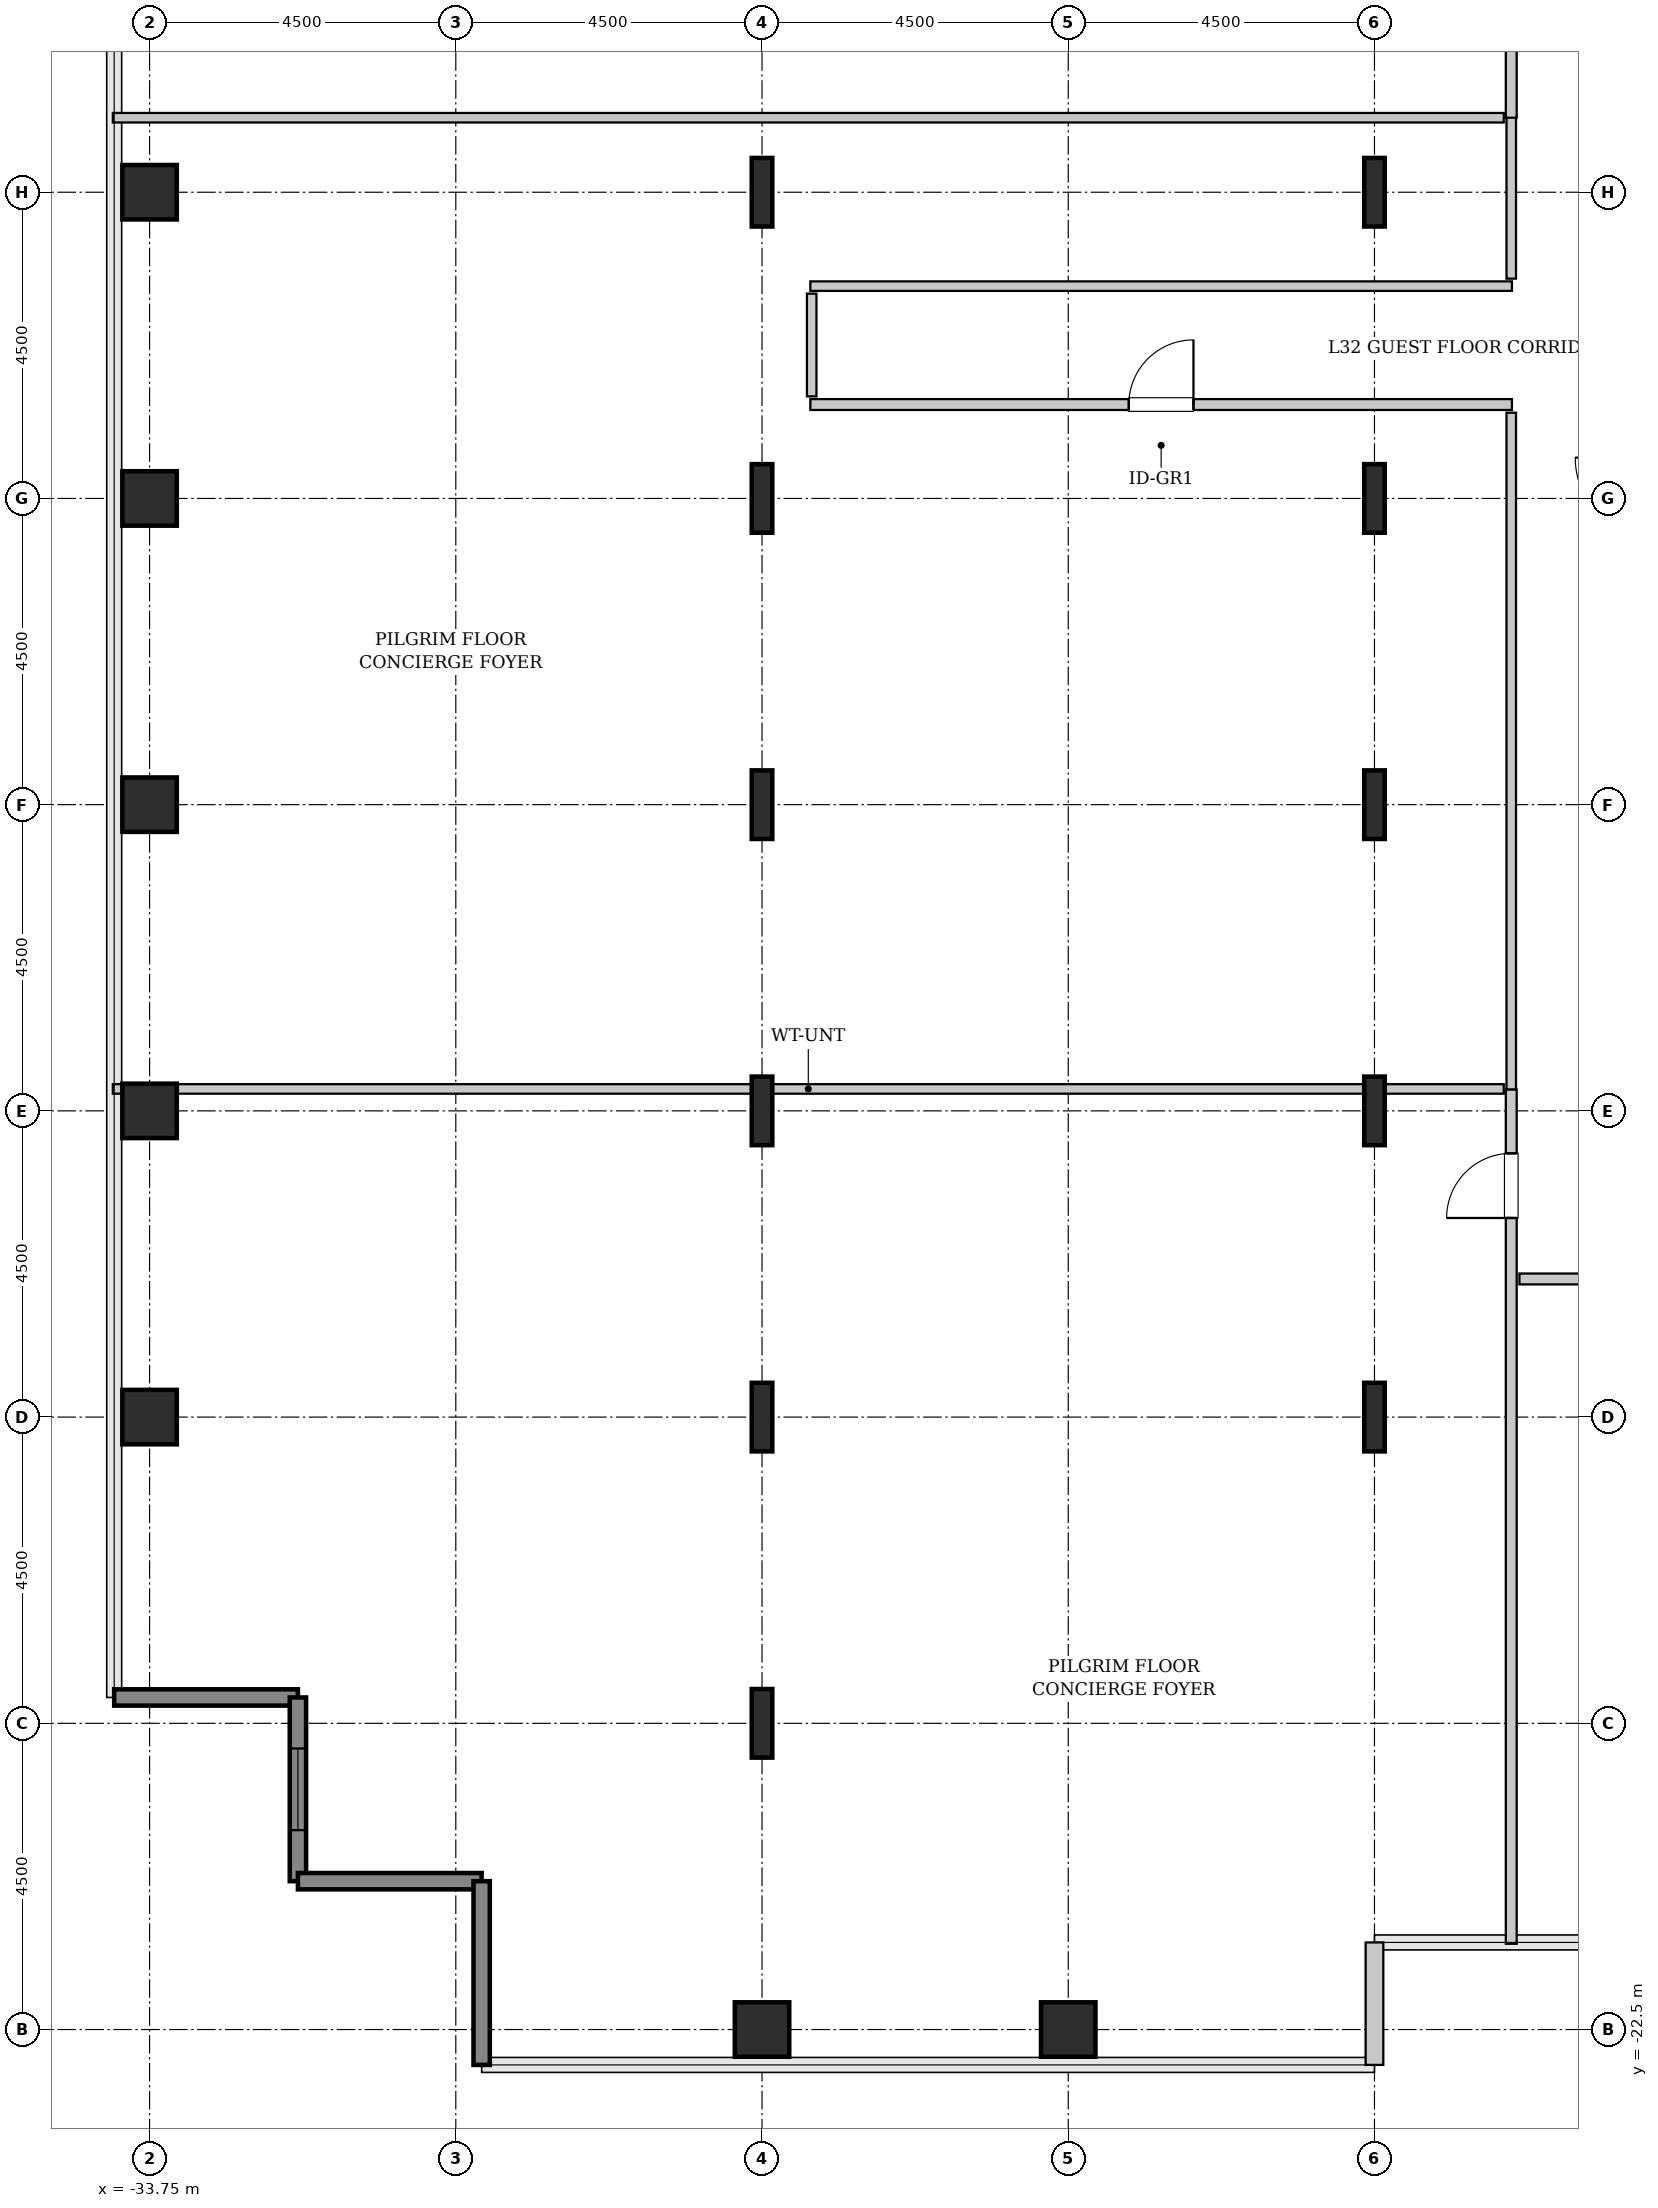
"""IFC4 building model, lengths in metres.
Left out: names, types, materials, properties, quantities, classifications, styles, units other than length and angle.
Written with IfcOpenShell. Run it as: python <this file> out.ifc"""

import sys

from ifc_helpers import new_model, si_unit, direction, frame, frame_2d, origin, origin_2d, place, context, subcontext, project, spatial, rectangle, hollow_rectangle, i_section, extrude, source, transform, mapped, element, fill, save


model = new_model("IFC4")
c1 = context("Model", 3, precision=1e-05, world=origin(), true_north=direction((0.0, 1.0)))
c2 = subcontext(c1, "Body", "Model", "MODEL_VIEW")
j1 = project(units=[si_unit("LENGTHUNIT", "METRE"), si_unit("PLANEANGLEUNIT", "RADIAN")], contexts=[c1])
p1 = place(None, origin())
s1 = spatial("IfcSite", under=j1, at=p1, CompositionType="ELEMENT")
p2 = place(p1, origin())
s2 = spatial("IfcBuilding", under=s1, at=p2, CompositionType="ELEMENT")
p3 = place(p2, frame((0.0, 0.0, 132.6)))
s3 = spatial("IfcBuildingStorey", under=s2, at=p3, CompositionType="ELEMENT", Elevation=132.6)
m1 = source(origin(), c2, "Body", "SweptSolid", [
    extrude(hollow_rectangle(XDim=0.8, YDim=0.8, WallThickness=0.04, InnerFilletRadius=0.04, OuterFilletRadius=0.08, at=origin_2d()), origin(), (0.0, 0.0, 1.0), 3.8),
])
for number, where, z_axis, x_axis in (
    (1, (-33.75, -13.5, 0.0), (0.0, 0.0, 1.0), (1.0, 0.0, 0.0)),
    (2, (-33.75, -9.0, 0.0), (0.0, 0.0, 1.0), (1.0, 0.0, 0.0)),
    (3, (-33.75, -4.5, 0.0), (0.0, 0.0, 1.0), (1.0, 0.0, 0.0)),
    (4, (-33.75, 0.0, 0.0), (0.0, 0.0, 1.0), (1.0, 0.0, 0.0)),
    (5, (-33.75, 4.5, 0.0), (0.0, 0.0, 1.0), (1.0, 0.0, 0.0)),
    (6, (-24.75, -22.5, 0.0), (0.0, 0.0, 1.0), (1.0, 0.0, 0.0)),
):
    element("IfcColumn", number, at=place(p3, frame(where, z_axis=z_axis, x_axis=x_axis)), inside=s3, PredefinedType="COLUMN", context=c2, shape_type="MappedRepresentation", body=[
        mapped(m1, transform((0.0, 0.0, 0.0), x_axis=(1.0, 0.0, 0.0), y_axis=(0.0, 1.0, 0.0), z_axis=(0.0, 0.0, 1.0), scale=1.0)),
    ])
m2 = source(origin(), c2, "Body", "SweptSolid", [
    extrude(i_section(OverallWidth=0.302, OverallDepth=1.008, WebThickness=0.021, FlangeThickness=0.04, FilletRadius=0.03, at=origin_2d()), origin(), (0.0, 0.0, 1.0), 3.8),
])
for number, where, z_axis, x_axis in (
    (7, (-24.75, -18.0, 0.0), (0.0, 0.0, 1.0), (1.0, 0.0, 0.0)),
    (8, (-24.75, -13.5, 0.0), (0.0, 0.0, 1.0), (1.0, 0.0, 0.0)),
    (9, (-24.75, -9.0, 0.0), (0.0, 0.0, 1.0), (1.0, 0.0, 0.0)),
    (10, (-24.75, -4.5, 0.0), (0.0, 0.0, 1.0), (1.0, 0.0, 0.0)),
    (11, (-24.75, 0.0, 0.0), (0.0, 0.0, 1.0), (1.0, 0.0, 0.0)),
    (12, (-24.75, 4.5, 0.0), (0.0, 0.0, 1.0), (1.0, 0.0, 0.0)),
):
    element("IfcColumn", number, at=place(p3, frame(where, z_axis=z_axis, x_axis=x_axis)), inside=s3, PredefinedType="COLUMN", context=c2, shape_type="MappedRepresentation", body=[
        mapped(m2, transform((0.0, 0.0, 0.0), x_axis=(1.0, 0.0, 0.0), y_axis=(0.0, 1.0, 0.0), z_axis=(0.0, 0.0, 1.0), scale=1.0)),
    ])
p4 = place(p3, frame((-20.25, -22.5, 0.0), z_axis=(0.0, 0.0, 1.0), x_axis=(1.0, 0.0, 0.0)))
e13 = element("IfcColumn", 13, at=p4, inside=s3, PredefinedType="COLUMN", context=c2, shape_type="MappedRepresentation", body=[
    mapped(m1, transform((0.0, 0.0, 0.0), x_axis=(1.0, 0.0, 0.0), y_axis=(0.0, 1.0, 0.0), z_axis=(0.0, 0.0, 1.0), scale=1.0)),
])
for number, where, z_axis, x_axis in (
    (14, (-15.75, -13.5, 0.0), (0.0, 0.0, 1.0), (1.0, 0.0, 0.0)),
    (15, (-15.75, -9.0, 0.0), (0.0, 0.0, 1.0), (1.0, 0.0, 0.0)),
    (16, (-15.75, -4.5, 0.0), (0.0, 0.0, 1.0), (1.0, 0.0, 0.0)),
    (17, (-15.75, 0.0, 0.0), (0.0, 0.0, 1.0), (1.0, 0.0, 0.0)),
    (18, (-15.75, 4.5, 0.0), (0.0, 0.0, 1.0), (1.0, 0.0, 0.0)),
):
    element("IfcColumn", number, at=place(p3, frame(where, z_axis=z_axis, x_axis=x_axis)), inside=s3, PredefinedType="COLUMN", context=c2, shape_type="MappedRepresentation", body=[
        mapped(m2, transform((0.0, 0.0, 0.0), x_axis=(1.0, 0.0, 0.0), y_axis=(0.0, 1.0, 0.0), z_axis=(0.0, 0.0, 1.0), scale=1.0)),
    ])
m3 = source(origin(), c2, "Body", "SweptSolid", [
    extrude(rectangle(XDim=2.7, YDim=0.24, at=frame_2d((1.35, 0.0))), origin(), (0.0, 0.0, 1.0), 3.55),
])
p5 = place(p3, frame((-34.27, -17.62, 0.0), z_axis=(0.0, 0.0, 1.0), x_axis=(1.0, 0.0, 0.0)))
e19 = element("IfcWall", 19, at=p5, inside=s3, PredefinedType="SHEAR", context=c2, shape_type="MappedRepresentation", body=[
    mapped(m3, transform((0.0, 0.0, 0.0), x_axis=(1.0, 0.0, 0.0), y_axis=(0.0, 1.0, 0.0), z_axis=(0.0, 0.0, 1.0), scale=1.0)),
])
p6 = place(p3, frame((-31.57, -17.62, 0.0), z_axis=(0.0, 0.0, 1.0), x_axis=(0.0, -1.0, 0.0)))
e20 = element("IfcWall", 20, at=p6, inside=s3, PredefinedType="SHEAR", context=c2, shape_type="MappedRepresentation", body=[
    mapped(m3, transform((0.0, 0.0, 0.0), x_axis=(1.0, 0.0, 0.0), y_axis=(0.0, 1.0, 0.0), z_axis=(0.0, 0.0, 1.0), scale=1.0)),
])
p7 = place(p6, frame((0.75, 0.0, 0.85)))
e21 = element("IfcOpeningElement", 21, at=p7, cuts=e20, PredefinedType="OPENING", context=c2, shape_type="SweptSolid", body=[
    extrude(rectangle(XDim=1.2, YDim=1.8, at=frame_2d((0.6, 0.9))), frame((0.0, 0.13, 0.0), z_axis=(0.0, -1.0, 0.0), x_axis=(1.0, 0.0, 0.0)), (0.0, 0.0, 1.0), 0.26),
])
for number, where, z_axis, x_axis in (
    (22, (-31.57, -20.32, 0.0), (0.0, 0.0, 1.0), (1.0, 0.0, 0.0)),
    (23, (-28.87, -20.32, 0.0), (0.0, 0.0, 1.0), (0.0, -1.0, 0.0)),
):
    element("IfcWall", number, at=place(p3, frame(where, z_axis=z_axis, x_axis=x_axis)), inside=s3, PredefinedType="SHEAR", context=c2, shape_type="MappedRepresentation", body=[
        mapped(m3, transform((0.0, 0.0, 0.0), x_axis=(1.0, 0.0, 0.0), y_axis=(0.0, 1.0, 0.0), z_axis=(0.0, 0.0, 1.0), scale=1.0)),
    ])
m4 = source(origin(), c2, "Body", "SweptSolid", [
    extrude(rectangle(XDim=1.8, YDim=0.26, at=frame_2d((0.9, 0.0))), origin(), (0.0, 0.0, 1.0), 3.55),
])
p8 = place(p3, frame((-15.75, -23.02, 0.0), z_axis=(0.0, 0.0, 1.0), x_axis=(0.0, 1.0, 0.0)))
e24 = element("IfcWall", 24, at=p8, inside=s3, PredefinedType="SOLIDWALL", context=c2, shape_type="MappedRepresentation", body=[
    mapped(m4, transform((0.0, 0.0, 0.0), x_axis=(1.0, 0.0, 0.0), y_axis=(0.0, 1.0, 0.0), z_axis=(0.0, 0.0, 1.0), scale=1.0)),
])
m5 = source(origin(), c2, "Body", "SweptSolid", [
    extrude(rectangle(XDim=10.31, YDim=0.16, at=frame_2d((5.155, 0.0))), origin(), (0.0, 0.0, 1.0), 3.535),
])
p9 = place(p3, frame((-24.04, 1.38, 0.0), z_axis=(0.0, 0.0, 1.0), x_axis=(1.0, 0.0, 0.0)))
e25 = element("IfcWall", 25, at=p9, inside=s3, PredefinedType="PARTITIONING", context=c2, shape_type="MappedRepresentation", body=[
    mapped(m5, transform((0.0, 0.0, 0.0), x_axis=(1.0, 0.0, 0.0), y_axis=(0.0, 1.0, 0.0), z_axis=(0.0, 0.0, 1.0), scale=1.0)),
])
p10 = place(p9, frame((4.68, 0.0, 0.0)))
e26 = element("IfcOpeningElement", 26, at=p10, cuts=e25, PredefinedType="OPENING", context=c2, shape_type="SweptSolid", body=[
    extrude(rectangle(XDim=0.95, YDim=2.1, at=frame_2d((0.475, 1.05))), frame((0.0, 0.09, 0.0), z_axis=(0.0, -1.0, 0.0), x_axis=(1.0, 0.0, 0.0)), (0.0, 0.0, 1.0), 0.18),
])
m6 = source(origin(), c2, "Body", "SweptSolid", [
    extrude(rectangle(XDim=10.31, YDim=0.14, at=frame_2d((5.155, 0.0))), origin(), (0.0, 0.0, 1.0), 3.535),
])
p11 = place(p3, frame((-24.04, 3.12, 0.0), z_axis=(0.0, 0.0, 1.0), x_axis=(1.0, 0.0, 0.0)))
e27 = element("IfcWall", 27, at=p11, inside=s3, PredefinedType="PARTITIONING", context=c2, shape_type="MappedRepresentation", body=[
    mapped(m6, transform((0.0, 0.0, 0.0), x_axis=(1.0, 0.0, 0.0), y_axis=(0.0, 1.0, 0.0), z_axis=(0.0, 0.0, 1.0), scale=1.0)),
])
m7 = source(origin(), c2, "Body", "SweptSolid", [
    extrude(rectangle(XDim=9.948, YDim=0.14, at=frame_2d((4.974, 0.0))), origin(), (0.0, 0.0, 1.0), 3.535),
])
p12 = place(p3, frame((-13.74, -8.688, 0.0), z_axis=(0.0, 0.0, 1.0), x_axis=(0.0, 1.0, 0.0)))
e28 = element("IfcWall", 28, at=p12, inside=s3, PredefinedType="PARTITIONING", context=c2, shape_type="MappedRepresentation", body=[
    mapped(m7, transform((0.0, 0.0, 0.0), x_axis=(1.0, 0.0, 0.0), y_axis=(0.0, 1.0, 0.0), z_axis=(0.0, 0.0, 1.0), scale=1.0)),
])
m8 = source(origin(), c2, "Body", "SweptSolid", [
    extrude(rectangle(XDim=2.375, YDim=0.14, at=frame_2d((1.188, 0.0))), origin(), (0.0, 0.0, 1.0), 3.535),
])
p13 = place(p3, frame((-13.74, 3.23, 0.0), z_axis=(0.0, 0.0, 1.0), x_axis=(0.0, 1.0, 0.0)))
e29 = element("IfcWall", 29, at=p13, inside=s3, PredefinedType="PARTITIONING", context=c2, shape_type="MappedRepresentation", body=[
    mapped(m8, transform((0.0, 0.0, 0.0), x_axis=(1.0, 0.0, 0.0), y_axis=(0.0, 1.0, 0.0), z_axis=(0.0, 0.0, 1.0), scale=1.0)),
])
m9 = source(origin(), c2, "Body", "SweptSolid", [
    extrude(rectangle(XDim=1.51, YDim=0.14, at=frame_2d((0.755, 0.0))), origin(), (0.0, 0.0, 1.0), 3.535),
])
p14 = place(p3, frame((-24.02, 1.5, 0.0), z_axis=(0.0, 0.0, 1.0), x_axis=(0.0, 1.0, 0.0)))
e30 = element("IfcWall", 30, at=p14, inside=s3, PredefinedType="PARTITIONING", context=c2, shape_type="MappedRepresentation", body=[
    mapped(m9, transform((0.0, 0.0, 0.0), x_axis=(1.0, 0.0, 0.0), y_axis=(0.0, 1.0, 0.0), z_axis=(0.0, 0.0, 1.0), scale=1.0)),
])
m10 = source(origin(), c2, "Body", "SweptSolid", [
    extrude(rectangle(XDim=20.44, YDim=0.14, at=frame_2d((10.22, 0.0))), origin(), (0.0, 0.0, 1.0), 2.875),
])
p15 = place(p3, frame((-34.29, -8.677, 0.0), z_axis=(0.0, 0.0, 1.0), x_axis=(1.0, 0.0, 0.0)))
e31 = element("IfcWall", 31, at=p15, inside=s3, PredefinedType="PARTITIONING", context=c2, shape_type="MappedRepresentation", body=[
    mapped(m10, transform((0.0, 0.0, 0.0), x_axis=(1.0, 0.0, 0.0), y_axis=(0.0, 1.0, 0.0), z_axis=(0.0, 0.0, 1.0), scale=1.0)),
])
m11 = source(origin(), c2, "Body", "SweptSolid", [
    extrude(rectangle(XDim=20.44, YDim=0.14, at=frame_2d((10.22, 0.0))), origin(), (0.0, 0.0, 1.0), 3.535),
])
p16 = place(p3, frame((-34.29, 5.595, 0.0), z_axis=(0.0, 0.0, 1.0), x_axis=(1.0, 0.0, 0.0)))
e32 = element("IfcWall", 32, at=p16, inside=s3, PredefinedType="PARTITIONING", context=c2, shape_type="MappedRepresentation", body=[
    mapped(m11, transform((0.0, 0.0, 0.0), x_axis=(1.0, 0.0, 0.0), y_axis=(0.0, 1.0, 0.0), z_axis=(0.0, 0.0, 1.0), scale=1.0)),
])
m12 = source(origin(), c2, "Body", "SweptSolid", [
    extrude(rectangle(XDim=12.552, YDim=0.16, at=frame_2d((6.276, 0.0))), origin(), (0.0, 0.0, 1.0), 3.535),
])
p17 = place(p3, frame((-13.74, -21.24, 0.0), z_axis=(0.0, 0.0, 1.0), x_axis=(0.0, 1.0, 0.0)))
e33 = element("IfcWall", 33, at=p17, inside=s3, PredefinedType="PARTITIONING", context=c2, shape_type="MappedRepresentation", body=[
    mapped(m12, transform((0.0, 0.0, 0.0), x_axis=(1.0, 0.0, 0.0), y_axis=(0.0, 1.0, 0.0), z_axis=(0.0, 0.0, 1.0), scale=1.0)),
])
p18 = place(p17, frame((10.666, 0.0, 0.0)))
e34 = element("IfcOpeningElement", 34, at=p18, cuts=e33, PredefinedType="OPENING", context=c2, shape_type="SweptSolid", body=[
    extrude(rectangle(XDim=0.95, YDim=2.1, at=frame_2d((0.475, 1.05))), frame((0.0, 0.09, 0.0), z_axis=(0.0, -1.0, 0.0), x_axis=(1.0, 0.0, 0.0)), (0.0, 0.0, 1.0), 0.18),
])
m13 = source(origin(), c2, "Body", "SweptSolid", [
    extrude(rectangle(XDim=15.645, YDim=0.16, at=frame_2d((7.823, 0.0))), origin(), (0.0, 0.0, 1.0), 3.535),
])
p19 = place(p3, frame((-13.74, 5.595, 0.0), z_axis=(0.0, 0.0, 1.0), x_axis=(0.0, 1.0, 0.0)))
e35 = element("IfcWall", 35, at=p19, inside=s3, PredefinedType="PARTITIONING", context=c2, shape_type="MappedRepresentation", body=[
    mapped(m13, transform((0.0, 0.0, 0.0), x_axis=(1.0, 0.0, 0.0), y_axis=(0.0, 1.0, 0.0), z_axis=(0.0, 0.0, 1.0), scale=1.0)),
])
p20 = place(p19, frame((2.482, 0.0, 0.0)))
e36 = element("IfcOpeningElement", 36, at=p20, cuts=e35, PredefinedType="OPENING", context=c2, shape_type="SweptSolid", body=[
    extrude(rectangle(XDim=0.95, YDim=2.1, at=frame_2d((0.475, 1.05))), frame((0.0, 0.09, 0.0), z_axis=(0.0, -1.0, 0.0), x_axis=(1.0, 0.0, 0.0)), (0.0, 0.0, 1.0), 0.18),
])
m14 = source(origin(), c2, "Body", "SweptSolid", [
    extrude(rectangle(XDim=6.225, YDim=0.16, at=frame_2d((3.113, 0.0))), origin(), (0.0, 0.0, 1.0), 3.535),
])
p21 = place(p3, frame((-13.62, -11.47, 0.0), z_axis=(0.0, 0.0, 1.0), x_axis=(1.0, 0.0, 0.0)))
e37 = element("IfcWall", 37, at=p21, inside=s3, PredefinedType="PARTITIONING", context=c2, shape_type="MappedRepresentation", body=[
    mapped(m14, transform((0.0, 0.0, 0.0), x_axis=(1.0, 0.0, 0.0), y_axis=(0.0, 1.0, 0.0), z_axis=(0.0, 0.0, 1.0), scale=1.0)),
])
p22 = place(p21, frame((2.637, 0.0, 0.0)))
e38 = element("IfcOpeningElement", 38, at=p22, cuts=e37, PredefinedType="OPENING", context=c2, shape_type="SweptSolid", body=[
    extrude(rectangle(XDim=0.95, YDim=2.1, at=frame_2d((0.475, 1.05))), frame((0.0, 0.09, 0.0), z_axis=(0.0, -1.0, 0.0), x_axis=(1.0, 0.0, 0.0)), (0.0, 0.0, 1.0), 0.18),
])
m15 = source(origin(), c2, "Body", "SweptSolid", [
    extrude(rectangle(XDim=1.2, YDim=1.8, at=frame_2d((0.6, 0.9))), frame((0.0, 0.03, 0.0), z_axis=(0.0, -1.0, 0.0), x_axis=(1.0, 0.0, 0.0)), (0.0, 0.0, 1.0), 0.06),
])
p23 = place(p7, origin())
e39 = element("IfcWindow", 39, at=p23, inside=s3, PartitioningType="SINGLE_PANEL", PredefinedType="WINDOW", context=c2, shape_type="MappedRepresentation", body=[
    mapped(m15, transform((0.0, 0.0, 0.0), x_axis=(1.0, 0.0, 0.0), y_axis=(0.0, 1.0, 0.0), z_axis=(0.0, 0.0, 1.0), scale=1.0)),
])
fill(e21, e39)
m16 = source(origin(), c2, "Body", "SweptSolid", [
    extrude(rectangle(XDim=0.95, YDim=2.1, at=frame_2d((0.475, 1.05))), frame((0.0, 0.025, 0.0), z_axis=(0.0, -1.0, 0.0), x_axis=(1.0, 0.0, 0.0)), (0.0, 0.0, 1.0), 0.05),
])
p24 = place(p10, origin())
e40 = element("IfcDoor", 40, at=p24, inside=s3, OperationType="SINGLE_SWING_RIGHT", PredefinedType="DOOR", context=c2, shape_type="MappedRepresentation", body=[
    mapped(m16, transform((0.0, 0.0, 0.0), x_axis=(1.0, 0.0, 0.0), y_axis=(0.0, 1.0, 0.0), z_axis=(0.0, 0.0, 1.0), scale=1.0)),
])
fill(e26, e40)
p25 = place(p18, origin())
e41 = element("IfcDoor", 41, at=p25, inside=s3, OperationType="SINGLE_SWING_LEFT", PredefinedType="DOOR", context=c2, shape_type="MappedRepresentation", body=[
    mapped(m16, transform((0.0, 0.0, 0.0), x_axis=(1.0, 0.0, 0.0), y_axis=(0.0, 1.0, 0.0), z_axis=(0.0, 0.0, 1.0), scale=1.0)),
])
fill(e34, e41)
save(model, sys.argv[1])
